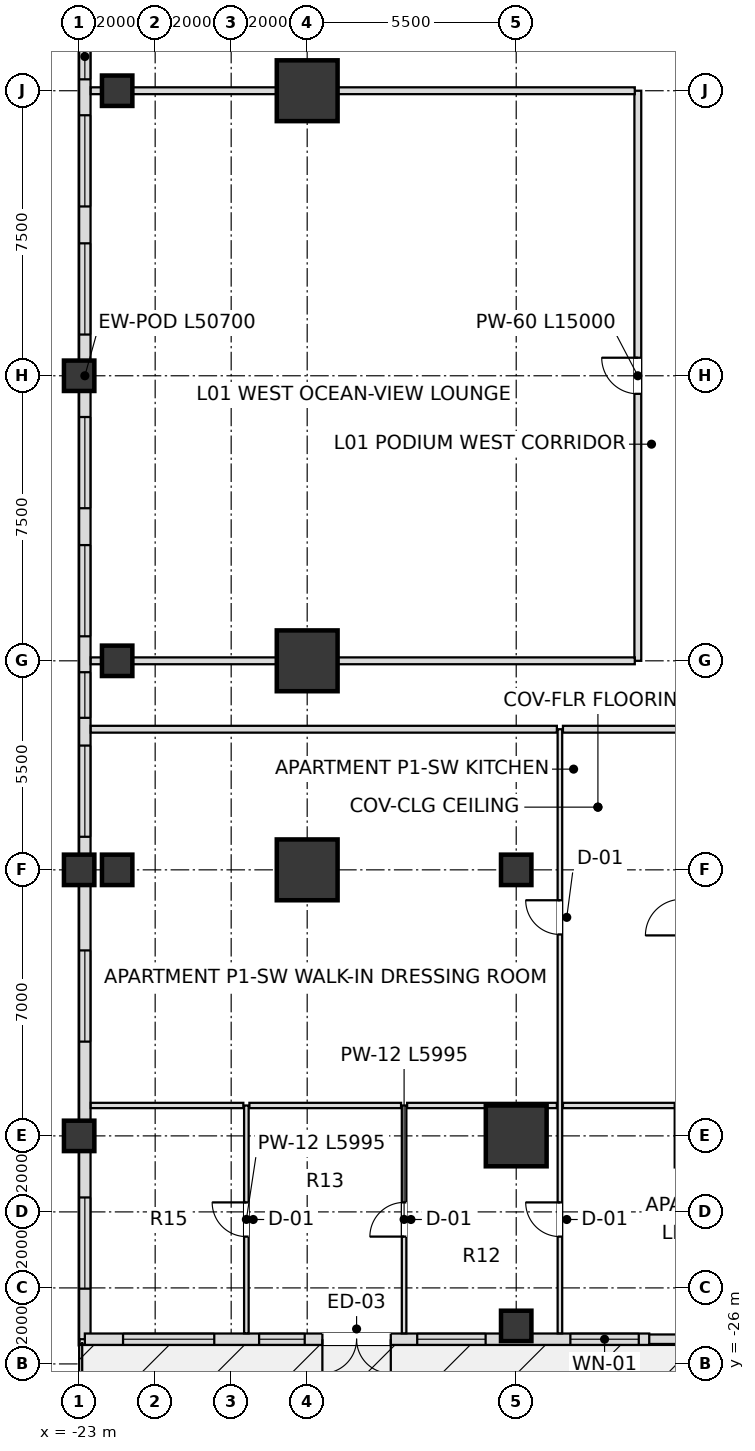
"""IFC4 building model, lengths in metres.
Left out: names, types, materials, properties, quantities, classifications, styles, units other than length and angle.
Written with IfcOpenShell. Run it as: python <this file> out.ifc"""

import sys

from ifc_helpers import new_model, si_unit, direction, frame, frame_2d, origin, origin_2d, place, context, subcontext, project, spatial, rectangle, extrude, element, fill, save


model = new_model("IFC4")
c1 = context("Model", 3, precision=1e-05, world=origin(), true_north=direction((0.0, 1.0)))
c2 = subcontext(c1, "Body", "Model", "MODEL_VIEW")
j1 = project(units=[si_unit("LENGTHUNIT", "METRE"), si_unit("PLANEANGLEUNIT", "RADIAN")], contexts=[c1])
p1 = place(None, origin())
s1 = spatial("IfcSite", under=j1, at=p1, CompositionType="ELEMENT")
p2 = place(p1, origin())
s2 = spatial("IfcBuilding", under=s1, at=p2, CompositionType="ELEMENT")
p3 = place(p2, frame((0.0, 0.0, 6.0)))
s3 = spatial("IfcBuildingStorey", under=s2, at=p3, CompositionType="ELEMENT", Elevation=6.0)
for number, where, z_axis, x_axis in (
    (1, (-11.5, -20.0, 0.0), (0.0, 0.0, 1.0), (1.0, 0.0, 0.0)),
    (2, (-17.0, 7.5, 0.0), (0.0, 0.0, 1.0), (1.0, 0.0, 0.0)),
    (3, (-17.0, -7.5, 0.0), (0.0, 0.0, 1.0), (1.0, 0.0, 0.0)),
    (4, (-17.0, -13.0, 0.0), (0.0, 0.0, 1.0), (1.0, 0.0, 0.0)),
):
    element("IfcColumn", number, at=place(p3, frame(where, z_axis=z_axis, x_axis=x_axis)), inside=s3, PredefinedType="USERDEFINED", context=c2, shape_type="SweptSolid", body=[
        extrude(rectangle(XDim=1.6, YDim=1.6, at=origin_2d()), origin(), (0.0, 0.0, 1.0), 5.4),
    ])
for number, where, z_axis, x_axis in (
    (5, (-23.0, -20.0, 0.0), (0.0, 0.0, 1.0), (1.0, 0.0, 0.0)),
    (6, (-23.0, -13.0, 0.0), (0.0, 0.0, 1.0), (1.0, 0.0, 0.0)),
    (7, (-23.0, 0.0, 0.0), (0.0, 0.0, 1.0), (1.0, 0.0, 0.0)),
    (8, (-11.5, -13.0, 0.0), (0.0, 0.0, 1.0), (1.0, 0.0, 0.0)),
    (9, (-11.5, -25.0, 0.0), (0.0, 0.0, 1.0), (1.0, 0.0, 0.0)),
    (10, (-22.0, -13.0, 0.0), (0.0, 0.0, 1.0), (1.0, 0.0, 0.0)),
    (11, (-22.0, -7.5, 0.0), (0.0, 0.0, 1.0), (1.0, 0.0, 0.0)),
    (12, (-22.0, 7.5, 0.0), (0.0, 0.0, 1.0), (1.0, 0.0, 0.0)),
):
    element("IfcColumn", number, at=place(p3, frame(where, z_axis=z_axis, x_axis=x_axis)), inside=s3, PredefinedType="COLUMN", context=c2, shape_type="SweptSolid", body=[
        extrude(rectangle(XDim=0.8, YDim=0.8, at=origin_2d()), origin(), (0.0, 0.0, 1.0), 5.4),
    ])
p4 = place(p3, frame((-22.85, 25.35, 0.0), z_axis=(0.0, 0.0, 1.0), x_axis=(0.0, -1.0, 0.0)))
e13 = element("IfcWall", 13, at=p4, inside=s3, PredefinedType="SOLIDWALL", context=c2, shape_type="SweptSolid", body=[
    extrude(rectangle(XDim=50.7, YDim=0.3, at=frame_2d((25.35, 0.0))), origin(), (0.0, 0.0, 1.0), 4.476),
])
p5 = place(p4, frame((1.33, 0.0, 0.8)))
e14 = element("IfcOpeningElement", 14, at=p5, cuts=e13, PredefinedType="OPENING", context=c2, shape_type="SweptSolid", body=[
    extrude(rectangle(XDim=2.4, YDim=2.2, at=frame_2d((1.2, 1.1))), frame((0.0, 0.16, 0.0), z_axis=(0.0, -1.0, 0.0), x_axis=(1.0, 0.0, 0.0)), (0.0, 0.0, 1.0), 0.32),
])
p6 = place(p4, frame((7.65, 0.0, 0.8)))
e15 = element("IfcOpeningElement", 15, at=p6, cuts=e13, PredefinedType="OPENING", context=c2, shape_type="SweptSolid", body=[
    extrude(rectangle(XDim=2.4, YDim=2.2, at=frame_2d((1.2, 1.1))), frame((0.0, 0.16, 0.0), z_axis=(0.0, -1.0, 0.0), x_axis=(1.0, 0.0, 0.0)), (0.0, 0.0, 1.0), 0.32),
])
p7 = place(p4, frame((13.22, 0.0, 0.8)))
e16 = element("IfcOpeningElement", 16, at=p7, cuts=e13, PredefinedType="OPENING", context=c2, shape_type="SweptSolid", body=[
    extrude(rectangle(XDim=2.4, YDim=2.2, at=frame_2d((1.2, 1.1))), frame((0.0, 0.16, 0.0), z_axis=(0.0, -1.0, 0.0), x_axis=(1.0, 0.0, 0.0)), (0.0, 0.0, 1.0), 0.32),
])
p8 = place(p4, frame((16.35, 0.0, 0.72)))
e17 = element("IfcOpeningElement", 17, at=p8, cuts=e13, PredefinedType="OPENING", context=c2, shape_type="SweptSolid", body=[
    extrude(rectangle(XDim=1.2, YDim=1.68, at=frame_2d((0.6, 0.84))), frame((0.0, 0.16, 0.0), z_axis=(0.0, -1.0, 0.0), x_axis=(1.0, 0.0, 0.0)), (0.0, 0.0, 1.0), 0.32),
])
p9 = place(p4, frame((18.495, 0.0, 0.8)))
e18 = element("IfcOpeningElement", 18, at=p9, cuts=e13, PredefinedType="OPENING", context=c2, shape_type="SweptSolid", body=[
    extrude(rectangle(XDim=2.4, YDim=2.2, at=frame_2d((1.2, 1.1))), frame((0.0, 0.16, 0.0), z_axis=(0.0, -1.0, 0.0), x_axis=(1.0, 0.0, 0.0)), (0.0, 0.0, 1.0), 0.32),
])
p10 = place(p4, frame((21.865, 0.0, 0.8)))
e19 = element("IfcOpeningElement", 19, at=p10, cuts=e13, PredefinedType="OPENING", context=c2, shape_type="SweptSolid", body=[
    extrude(rectangle(XDim=2.4, YDim=2.2, at=frame_2d((1.2, 1.1))), frame((0.0, 0.16, 0.0), z_axis=(0.0, -1.0, 0.0), x_axis=(1.0, 0.0, 0.0)), (0.0, 0.0, 1.0), 0.32),
])
p11 = place(p4, frame((26.435, 0.0, 0.8)))
e20 = element("IfcOpeningElement", 20, at=p11, cuts=e13, PredefinedType="OPENING", context=c2, shape_type="SweptSolid", body=[
    extrude(rectangle(XDim=2.4, YDim=2.2, at=frame_2d((1.2, 1.1))), frame((0.0, 0.16, 0.0), z_axis=(0.0, -1.0, 0.0), x_axis=(1.0, 0.0, 0.0)), (0.0, 0.0, 1.0), 0.32),
])
p12 = place(p4, frame((29.805, 0.0, 0.8)))
e21 = element("IfcOpeningElement", 21, at=p12, cuts=e13, PredefinedType="OPENING", context=c2, shape_type="SweptSolid", body=[
    extrude(rectangle(XDim=2.4, YDim=2.2, at=frame_2d((1.2, 1.1))), frame((0.0, 0.16, 0.0), z_axis=(0.0, -1.0, 0.0), x_axis=(1.0, 0.0, 0.0)), (0.0, 0.0, 1.0), 0.32),
])
p13 = place(p4, frame((33.15, 0.0, 0.72)))
e22 = element("IfcOpeningElement", 22, at=p13, cuts=e13, PredefinedType="OPENING", context=c2, shape_type="SweptSolid", body=[
    extrude(rectangle(XDim=1.2, YDim=1.68, at=frame_2d((0.6, 0.84))), frame((0.0, 0.16, 0.0), z_axis=(0.0, -1.0, 0.0), x_axis=(1.0, 0.0, 0.0)), (0.0, 0.0, 1.0), 0.32),
])
p14 = place(p4, frame((35.08, 0.0, 0.8)))
e23 = element("IfcOpeningElement", 23, at=p14, cuts=e13, PredefinedType="OPENING", context=c2, shape_type="SweptSolid", body=[
    extrude(rectangle(XDim=2.4, YDim=2.2, at=frame_2d((1.2, 1.1))), frame((0.0, 0.16, 0.0), z_axis=(0.0, -1.0, 0.0), x_axis=(1.0, 0.0, 0.0)), (0.0, 0.0, 1.0), 0.32),
])
p15 = place(p4, frame((40.47, 0.0, 0.8)))
e24 = element("IfcOpeningElement", 24, at=p15, cuts=e13, PredefinedType="OPENING", context=c2, shape_type="SweptSolid", body=[
    extrude(rectangle(XDim=2.4, YDim=2.2, at=frame_2d((1.2, 1.1))), frame((0.0, 0.16, 0.0), z_axis=(0.0, -1.0, 0.0), x_axis=(1.0, 0.0, 0.0)), (0.0, 0.0, 1.0), 0.32),
])
p16 = place(p4, frame((46.97, 0.0, 0.8)))
e25 = element("IfcOpeningElement", 25, at=p16, cuts=e13, PredefinedType="OPENING", context=c2, shape_type="SweptSolid", body=[
    extrude(rectangle(XDim=2.4, YDim=2.2, at=frame_2d((1.2, 1.1))), frame((0.0, 0.16, 0.0), z_axis=(0.0, -1.0, 0.0), x_axis=(1.0, 0.0, 0.0)), (0.0, 0.0, 1.0), 0.32),
])
p17 = place(p3, frame((-8.025, -25.35, 0.0), z_axis=(0.0, 0.0, 1.0), x_axis=(1.0, 0.0, 0.0)))
e26 = element("IfcWall", 26, at=p17, inside=s3, PredefinedType="SOLIDWALL", context=c2, shape_type="SweptSolid", body=[
    extrude(rectangle(XDim=1.13, YDim=0.25, at=frame_2d((0.565, 0.0))), origin(), (0.0, 0.0, 1.0), 4.476),
])
p18 = place(p3, frame((-8.0, -25.35, 0.0), z_axis=(0.0, 0.0, 1.0), x_axis=(-1.0, 0.0, 0.0)))
e27 = element("IfcWall", 27, at=p18, inside=s3, PredefinedType="SOLIDWALL", context=c2, shape_type="SweptSolid", body=[
    extrude(rectangle(XDim=14.85, YDim=0.3, at=frame_2d((7.425, 0.0))), origin(), (0.0, 0.0, 1.0), 4.476),
])
p19 = place(p18, frame((6.8, 0.0, 0.0)))
e28 = element("IfcOpeningElement", 28, at=p19, cuts=e27, PredefinedType="OPENING", context=c2, shape_type="SweptSolid", body=[
    extrude(rectangle(XDim=1.8, YDim=2.3, at=frame_2d((0.9, 1.15))), frame((0.0, 0.16, 0.0), z_axis=(0.0, -1.0, 0.0), x_axis=(1.0, 0.0, 0.0)), (0.0, 0.0, 1.0), 0.32),
])
p20 = place(p18, frame((0.275, 0.0, 0.72)))
e29 = element("IfcOpeningElement", 29, at=p20, cuts=e27, PredefinedType="OPENING", context=c2, shape_type="SweptSolid", body=[
    extrude(rectangle(XDim=1.8, YDim=1.68, at=frame_2d((0.9, 0.84))), frame((0.0, 0.16, 0.0), z_axis=(0.0, -1.0, 0.0), x_axis=(1.0, 0.0, 0.0)), (0.0, 0.0, 1.0), 0.32),
])
p21 = place(p18, frame((4.305, 0.0, 0.72)))
e30 = element("IfcOpeningElement", 30, at=p21, cuts=e27, PredefinedType="OPENING", context=c2, shape_type="SweptSolid", body=[
    extrude(rectangle(XDim=1.8, YDim=1.68, at=frame_2d((0.9, 0.84))), frame((0.0, 0.16, 0.0), z_axis=(0.0, -1.0, 0.0), x_axis=(1.0, 0.0, 0.0)), (0.0, 0.0, 1.0), 0.32),
])
p22 = place(p18, frame((9.065, 0.0, 0.72)))
e31 = element("IfcOpeningElement", 31, at=p22, cuts=e27, PredefinedType="OPENING", context=c2, shape_type="SweptSolid", body=[
    extrude(rectangle(XDim=1.2, YDim=1.68, at=frame_2d((0.6, 0.84))), frame((0.0, 0.16, 0.0), z_axis=(0.0, -1.0, 0.0), x_axis=(1.0, 0.0, 0.0)), (0.0, 0.0, 1.0), 0.32),
])
p23 = place(p18, frame((11.445, 0.0, 0.8)))
e32 = element("IfcOpeningElement", 32, at=p23, cuts=e27, PredefinedType="OPENING", context=c2, shape_type="SweptSolid", body=[
    extrude(rectangle(XDim=2.4, YDim=2.2, at=frame_2d((1.2, 1.1))), frame((0.0, 0.16, 0.0), z_axis=(0.0, -1.0, 0.0), x_axis=(1.0, 0.0, 0.0)), (0.0, 0.0, 1.0), 0.32),
])
p24 = place(p3, frame((-18.6, -25.195, 0.0), z_axis=(0.0, 0.0, 1.0), x_axis=(0.0, 1.0, 0.0)))
e33 = element("IfcWall", 33, at=p24, inside=s3, PredefinedType="PARTITIONING", context=c2, shape_type="SweptSolid", body=[
    extrude(rectangle(XDim=5.995, YDim=0.12, at=frame_2d((2.998, 0.0))), origin(), (0.0, 0.0, 1.0), 4.476),
])
p25 = place(p24, frame((2.545, 0.0, 0.0)))
e34 = element("IfcOpeningElement", 34, at=p25, cuts=e33, PredefinedType="OPENING", context=c2, shape_type="SweptSolid", body=[
    extrude(rectangle(XDim=0.9, YDim=2.1, at=frame_2d((0.45, 1.05))), frame((0.0, 0.07, 0.0), z_axis=(0.0, -1.0, 0.0), x_axis=(1.0, 0.0, 0.0)), (0.0, 0.0, 1.0), 0.14),
])
p26 = place(p3, frame((-14.45, -25.195, 0.0), z_axis=(0.0, 0.0, 1.0), x_axis=(0.0, 1.0, 0.0)))
e35 = element("IfcWall", 35, at=p26, inside=s3, PredefinedType="PARTITIONING", context=c2, shape_type="SweptSolid", body=[
    extrude(rectangle(XDim=5.995, YDim=0.12, at=frame_2d((2.998, 0.0))), origin(), (0.0, 0.0, 1.0), 4.476),
])
p27 = place(p26, frame((2.545, 0.0, 0.0)))
e36 = element("IfcOpeningElement", 36, at=p27, cuts=e35, PredefinedType="OPENING", context=c2, shape_type="SweptSolid", body=[
    extrude(rectangle(XDim=0.9, YDim=2.1, at=frame_2d((0.45, 1.05))), frame((0.0, 0.07, 0.0), z_axis=(0.0, -1.0, 0.0), x_axis=(1.0, 0.0, 0.0)), (0.0, 0.0, 1.0), 0.14),
])
p28 = place(p3, frame((-10.35, -25.195, 0.0), z_axis=(0.0, 0.0, 1.0), x_axis=(0.0, 1.0, 0.0)))
e37 = element("IfcWall", 37, at=p28, inside=s3, PredefinedType="PARTITIONING", context=c2, shape_type="SweptSolid", body=[
    extrude(rectangle(XDim=15.895, YDim=0.12, at=frame_2d((7.948, 0.0))), origin(), (0.0, 0.0, 1.0), 4.41),
])
p29 = place(p28, frame((10.495, 0.0, 0.0)))
e38 = element("IfcOpeningElement", 38, at=p29, cuts=e37, PredefinedType="OPENING", context=c2, shape_type="SweptSolid", body=[
    extrude(rectangle(XDim=0.9, YDim=2.1, at=frame_2d((0.45, 1.05))), frame((0.0, 0.07, 0.0), z_axis=(0.0, -1.0, 0.0), x_axis=(1.0, 0.0, 0.0)), (0.0, 0.0, 1.0), 0.14),
])
p30 = place(p28, frame((2.545, 0.0, 0.0)))
e39 = element("IfcOpeningElement", 39, at=p30, cuts=e37, PredefinedType="OPENING", context=c2, shape_type="SweptSolid", body=[
    extrude(rectangle(XDim=0.9, YDim=2.1, at=frame_2d((0.45, 1.05))), frame((0.0, 0.07, 0.0), z_axis=(0.0, -1.0, 0.0), x_axis=(1.0, 0.0, 0.0)), (0.0, 0.0, 1.0), 0.14),
])
p31 = place(p3, frame((-8.3, -7.5, 0.0), z_axis=(0.0, 0.0, 1.0), x_axis=(0.0, 1.0, 0.0)))
e40 = element("IfcWall", 40, at=p31, inside=s3, PredefinedType="PARTITIONING", context=c2, shape_type="SweptSolid", body=[
    extrude(rectangle(XDim=15.0, YDim=0.18, at=frame_2d((7.5, 0.0))), origin(), (0.0, 0.0, 1.0), 5.12),
])
p32 = place(p31, frame((7.025, 0.0, 0.0)))
e41 = element("IfcOpeningElement", 41, at=p32, cuts=e40, PredefinedType="OPENING", context=c2, shape_type="SweptSolid", body=[
    extrude(rectangle(XDim=0.95, YDim=2.15, at=frame_2d((0.475, 1.075))), frame((0.0, 0.1, 0.0), z_axis=(0.0, -1.0, 0.0), x_axis=(1.0, 0.0, 0.0)), (0.0, 0.0, 1.0), 0.2),
])
p33 = place(p3, frame((-22.695, -19.2, 0.0), z_axis=(0.0, 0.0, 1.0), x_axis=(1.0, 0.0, 0.0)))
e42 = element("IfcWall", 42, at=p33, inside=s3, PredefinedType="PARTITIONING", context=c2, shape_type="SweptSolid", body=[
    extrude(rectangle(XDim=4.015, YDim=0.14, at=frame_2d((2.008, 0.0))), origin(), (0.0, 0.0, 1.0), 5.12),
])
p34 = place(p3, frame((-18.52, -19.2, 0.0), z_axis=(0.0, 0.0, 1.0), x_axis=(1.0, 0.0, 0.0)))
e43 = element("IfcWall", 43, at=p34, inside=s3, PredefinedType="PARTITIONING", context=c2, shape_type="SweptSolid", body=[
    extrude(rectangle(XDim=3.99, YDim=0.14, at=frame_2d((1.995, 0.0))), origin(), (0.0, 0.0, 1.0), 5.12),
])
p35 = place(p3, frame((-14.37, -19.2, 0.0), z_axis=(0.0, 0.0, 1.0), x_axis=(1.0, 0.0, 0.0)))
e44 = element("IfcWall", 44, at=p35, inside=s3, PredefinedType="PARTITIONING", context=c2, shape_type="SweptSolid", body=[
    extrude(rectangle(XDim=3.94, YDim=0.14, at=frame_2d((1.97, 0.0))), origin(), (0.0, 0.0, 1.0), 5.12),
])
p36 = place(p3, frame((-10.27, -19.2, 0.0), z_axis=(0.0, 0.0, 1.0), x_axis=(1.0, 0.0, 0.0)))
e45 = element("IfcWall", 45, at=p36, inside=s3, PredefinedType="PARTITIONING", context=c2, shape_type="SweptSolid", body=[
    extrude(rectangle(XDim=3.04, YDim=0.14, at=frame_2d((1.52, 0.0))), origin(), (0.0, 0.0, 1.0), 5.12),
])
p37 = place(p3, frame((-22.695, -9.3, 0.0), z_axis=(0.0, 0.0, 1.0), x_axis=(1.0, 0.0, 0.0)))
e46 = element("IfcWall", 46, at=p37, inside=s3, PredefinedType="PARTITIONING", context=c2, shape_type="SweptSolid", body=[
    extrude(rectangle(XDim=12.265, YDim=0.18, at=frame_2d((6.133, 0.0))), origin(), (0.0, 0.0, 1.0), 4.41),
])
p38 = place(p3, frame((-10.27, -9.3, 0.0), z_axis=(0.0, 0.0, 1.0), x_axis=(1.0, 0.0, 0.0)))
e47 = element("IfcWall", 47, at=p38, inside=s3, PredefinedType="PARTITIONING", context=c2, shape_type="SweptSolid", body=[
    extrude(rectangle(XDim=3.04, YDim=0.18, at=frame_2d((1.52, 0.0))), origin(), (0.0, 0.0, 1.0), 5.12),
])
for number, where, z_axis, x_axis in (
    (48, (-22.695, -7.5, 0.0), (0.0, 0.0, 1.0), (1.0, 0.0, 0.0)),
    (49, (-22.695, 7.5, 0.0), (0.0, 0.0, 1.0), (1.0, 0.0, 0.0)),
):
    element("IfcWall", number, at=place(p3, frame(where, z_axis=z_axis, x_axis=x_axis)), inside=s3, PredefinedType="PARTITIONING", context=c2, shape_type="SweptSolid", body=[
        extrude(rectangle(XDim=14.315, YDim=0.18, at=frame_2d((7.158, 0.0))), origin(), (0.0, 0.0, 1.0), 4.41),
    ])
p39 = place(p8, origin())
e50 = element("IfcWindow", 50, at=p39, inside=s3, PartitioningType="SINGLE_PANEL", PredefinedType="WINDOW", context=c2, shape_type="SweptSolid", body=[
    extrude(rectangle(XDim=1.2, YDim=1.68, at=frame_2d((0.6, 0.84))), frame((0.0, 0.03, 0.0), z_axis=(0.0, -1.0, 0.0), x_axis=(1.0, 0.0, 0.0)), (0.0, 0.0, 1.0), 0.06),
])
fill(e17, e50)
p40 = place(p9, origin())
e51 = element("IfcWindow", 51, at=p40, inside=s3, PartitioningType="SINGLE_PANEL", PredefinedType="WINDOW", context=c2, shape_type="SweptSolid", body=[
    extrude(rectangle(XDim=2.4, YDim=2.2, at=frame_2d((1.2, 1.1))), frame((0.0, 0.03, 0.0), z_axis=(0.0, -1.0, 0.0), x_axis=(1.0, 0.0, 0.0)), (0.0, 0.0, 1.0), 0.06),
])
fill(e18, e51)
p41 = place(p10, origin())
e52 = element("IfcWindow", 52, at=p41, inside=s3, PartitioningType="SINGLE_PANEL", PredefinedType="WINDOW", context=c2, shape_type="SweptSolid", body=[
    extrude(rectangle(XDim=2.4, YDim=2.2, at=frame_2d((1.2, 1.1))), frame((0.0, 0.03, 0.0), z_axis=(0.0, -1.0, 0.0), x_axis=(1.0, 0.0, 0.0)), (0.0, 0.0, 1.0), 0.06),
])
fill(e19, e52)
p42 = place(p11, origin())
e53 = element("IfcWindow", 53, at=p42, inside=s3, PartitioningType="SINGLE_PANEL", PredefinedType="WINDOW", context=c2, shape_type="SweptSolid", body=[
    extrude(rectangle(XDim=2.4, YDim=2.2, at=frame_2d((1.2, 1.1))), frame((0.0, 0.03, 0.0), z_axis=(0.0, -1.0, 0.0), x_axis=(1.0, 0.0, 0.0)), (0.0, 0.0, 1.0), 0.06),
])
fill(e20, e53)
p43 = place(p12, origin())
e54 = element("IfcWindow", 54, at=p43, inside=s3, PartitioningType="SINGLE_PANEL", PredefinedType="WINDOW", context=c2, shape_type="SweptSolid", body=[
    extrude(rectangle(XDim=2.4, YDim=2.2, at=frame_2d((1.2, 1.1))), frame((0.0, 0.03, 0.0), z_axis=(0.0, -1.0, 0.0), x_axis=(1.0, 0.0, 0.0)), (0.0, 0.0, 1.0), 0.06),
])
fill(e21, e54)
p44 = place(p13, origin())
e55 = element("IfcWindow", 55, at=p44, inside=s3, PartitioningType="SINGLE_PANEL", PredefinedType="WINDOW", context=c2, shape_type="SweptSolid", body=[
    extrude(rectangle(XDim=1.2, YDim=1.68, at=frame_2d((0.6, 0.84))), frame((0.0, 0.03, 0.0), z_axis=(0.0, -1.0, 0.0), x_axis=(1.0, 0.0, 0.0)), (0.0, 0.0, 1.0), 0.06),
])
fill(e22, e55)
p45 = place(p14, origin())
e56 = element("IfcWindow", 56, at=p45, inside=s3, PartitioningType="SINGLE_PANEL", PredefinedType="WINDOW", context=c2, shape_type="SweptSolid", body=[
    extrude(rectangle(XDim=2.4, YDim=2.2, at=frame_2d((1.2, 1.1))), frame((0.0, 0.03, 0.0), z_axis=(0.0, -1.0, 0.0), x_axis=(1.0, 0.0, 0.0)), (0.0, 0.0, 1.0), 0.06),
])
fill(e23, e56)
p46 = place(p15, origin())
e57 = element("IfcWindow", 57, at=p46, inside=s3, PartitioningType="SINGLE_PANEL", PredefinedType="WINDOW", context=c2, shape_type="SweptSolid", body=[
    extrude(rectangle(XDim=2.4, YDim=2.2, at=frame_2d((1.2, 1.1))), frame((0.0, 0.03, 0.0), z_axis=(0.0, -1.0, 0.0), x_axis=(1.0, 0.0, 0.0)), (0.0, 0.0, 1.0), 0.06),
])
fill(e24, e57)
p47 = place(p16, origin())
e58 = element("IfcWindow", 58, at=p47, inside=s3, PartitioningType="SINGLE_PANEL", PredefinedType="WINDOW", context=c2, shape_type="SweptSolid", body=[
    extrude(rectangle(XDim=2.4, YDim=2.2, at=frame_2d((1.2, 1.1))), frame((0.0, 0.03, 0.0), z_axis=(0.0, -1.0, 0.0), x_axis=(1.0, 0.0, 0.0)), (0.0, 0.0, 1.0), 0.06),
])
fill(e25, e58)
p48 = place(p19, origin())
e59 = element("IfcDoor", 59, at=p48, inside=s3, OperationType="DOUBLE_DOOR_SINGLE_SWING", PredefinedType="DOOR", context=c2, shape_type="SweptSolid", body=[
    extrude(rectangle(XDim=1.8, YDim=2.3, at=frame_2d((0.9, 1.15))), frame((0.0, 0.025, 0.0), z_axis=(0.0, -1.0, 0.0), x_axis=(1.0, 0.0, 0.0)), (0.0, 0.0, 1.0), 0.05),
])
fill(e28, e59)
p49 = place(p20, origin())
e60 = element("IfcWindow", 60, at=p49, inside=s3, PartitioningType="SINGLE_PANEL", PredefinedType="WINDOW", context=c2, shape_type="SweptSolid", body=[
    extrude(rectangle(XDim=1.8, YDim=1.68, at=frame_2d((0.9, 0.84))), frame((0.0, 0.03, 0.0), z_axis=(0.0, -1.0, 0.0), x_axis=(1.0, 0.0, 0.0)), (0.0, 0.0, 1.0), 0.06),
])
fill(e29, e60)
p50 = place(p21, origin())
e61 = element("IfcWindow", 61, at=p50, inside=s3, PartitioningType="SINGLE_PANEL", PredefinedType="WINDOW", context=c2, shape_type="SweptSolid", body=[
    extrude(rectangle(XDim=1.8, YDim=1.68, at=frame_2d((0.9, 0.84))), frame((0.0, 0.03, 0.0), z_axis=(0.0, -1.0, 0.0), x_axis=(1.0, 0.0, 0.0)), (0.0, 0.0, 1.0), 0.06),
])
fill(e30, e61)
p51 = place(p22, origin())
e62 = element("IfcWindow", 62, at=p51, inside=s3, PartitioningType="SINGLE_PANEL", PredefinedType="WINDOW", context=c2, shape_type="SweptSolid", body=[
    extrude(rectangle(XDim=1.2, YDim=1.68, at=frame_2d((0.6, 0.84))), frame((0.0, 0.03, 0.0), z_axis=(0.0, -1.0, 0.0), x_axis=(1.0, 0.0, 0.0)), (0.0, 0.0, 1.0), 0.06),
])
fill(e31, e62)
p52 = place(p23, origin())
e63 = element("IfcWindow", 63, at=p52, inside=s3, PartitioningType="SINGLE_PANEL", PredefinedType="WINDOW", context=c2, shape_type="SweptSolid", body=[
    extrude(rectangle(XDim=2.4, YDim=2.2, at=frame_2d((1.2, 1.1))), frame((0.0, 0.03, 0.0), z_axis=(0.0, -1.0, 0.0), x_axis=(1.0, 0.0, 0.0)), (0.0, 0.0, 1.0), 0.06),
])
fill(e32, e63)
p53 = place(p29, origin())
e64 = element("IfcDoor", 64, at=p53, inside=s3, OperationType="SINGLE_SWING_RIGHT", PredefinedType="DOOR", context=c2, shape_type="SweptSolid", body=[
    extrude(rectangle(XDim=0.9, YDim=2.1, at=frame_2d((0.45, 1.05))), frame((0.0, 0.025, 0.0), z_axis=(0.0, -1.0, 0.0), x_axis=(1.0, 0.0, 0.0)), (0.0, 0.0, 1.0), 0.05),
])
fill(e38, e64)
p54 = place(p30, origin())
e65 = element("IfcDoor", 65, at=p54, inside=s3, OperationType="SINGLE_SWING_RIGHT", PredefinedType="DOOR", context=c2, shape_type="SweptSolid", body=[
    extrude(rectangle(XDim=0.9, YDim=2.1, at=frame_2d((0.45, 1.05))), frame((0.0, 0.025, 0.0), z_axis=(0.0, -1.0, 0.0), x_axis=(1.0, 0.0, 0.0)), (0.0, 0.0, 1.0), 0.05),
])
fill(e39, e65)
p55 = place(p27, origin())
e66 = element("IfcDoor", 66, at=p55, inside=s3, OperationType="SINGLE_SWING_LEFT", PredefinedType="DOOR", context=c2, shape_type="SweptSolid", body=[
    extrude(rectangle(XDim=0.9, YDim=2.1, at=frame_2d((0.45, 1.05))), frame((0.0, 0.025, 0.0), z_axis=(0.0, -1.0, 0.0), x_axis=(1.0, 0.0, 0.0)), (0.0, 0.0, 1.0), 0.05),
])
fill(e36, e66)
p56 = place(p25, origin())
e67 = element("IfcDoor", 67, at=p56, inside=s3, OperationType="SINGLE_SWING_RIGHT", PredefinedType="DOOR", context=c2, shape_type="SweptSolid", body=[
    extrude(rectangle(XDim=0.9, YDim=2.1, at=frame_2d((0.45, 1.05))), frame((0.0, 0.025, 0.0), z_axis=(0.0, -1.0, 0.0), x_axis=(1.0, 0.0, 0.0)), (0.0, 0.0, 1.0), 0.05),
])
fill(e34, e67)
p57 = place(p32, origin())
e68 = element("IfcDoor", 68, at=p57, inside=s3, OperationType="SINGLE_SWING_RIGHT", PredefinedType="DOOR", context=c2, shape_type="SweptSolid", body=[
    extrude(rectangle(XDim=0.95, YDim=2.15, at=frame_2d((0.475, 1.075))), frame((0.0, 0.025, 0.0), z_axis=(0.0, -1.0, 0.0), x_axis=(1.0, 0.0, 0.0)), (0.0, 0.0, 1.0), 0.05),
])
fill(e41, e68)
save(model, sys.argv[1])
